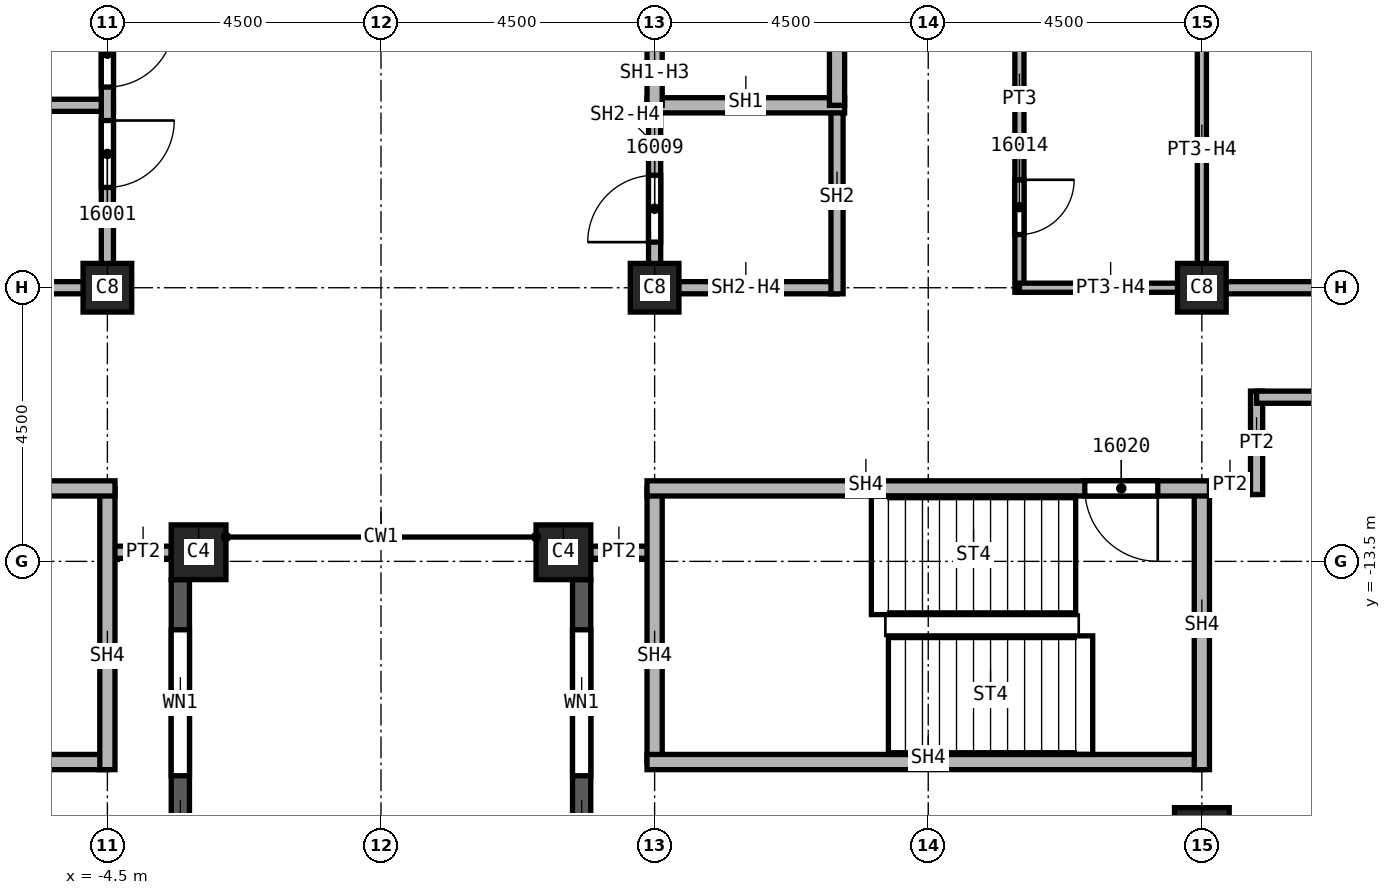
"""IFC4 building model, lengths in metres.
Left out: names, types, materials, properties, quantities, classifications, styles, units other than length and angle.
Written with IfcOpenShell. Run it as: python <this file> out.ifc"""

import sys

from ifc_helpers import new_model, si_unit, direction, frame, frame_2d, origin, origin_2d, place, context, subcontext, project, spatial, rectangle, extrude, element, fill, save


model = new_model("IFC4")
c1 = context("Model", 3, precision=1e-05, world=origin(), true_north=direction((0.0, 1.0)))
c2 = subcontext(c1, "Body", "Model", "MODEL_VIEW")
j1 = project(units=[si_unit("LENGTHUNIT", "METRE"), si_unit("PLANEANGLEUNIT", "RADIAN")], contexts=[c1])
p1 = place(None, origin())
s1 = spatial("IfcSite", under=j1, at=p1, CompositionType="ELEMENT")
p2 = place(p1, origin())
s2 = spatial("IfcBuilding", under=s1, at=p2, CompositionType="ELEMENT")
p3 = place(p2, frame((0.0, 0.0, 246.0)))
s3 = spatial("IfcBuildingStorey", under=s2, at=p3, CompositionType="ELEMENT", Elevation=246.0)
p4 = place(p3, frame((13.5, -18.0, 0.0), z_axis=(0.0, 0.0, 1.0), x_axis=(1.0, 0.0, 0.0)))
e1 = element("IfcColumn", 1, at=p4, inside=s3, PredefinedType="COLUMN", context=c2, shape_type="SweptSolid", body=[
    extrude(rectangle(XDim=0.9, YDim=0.9, at=origin_2d()), origin(), (0.0, 0.0, 1.0), 3.72),
])
for number, where, z_axis, x_axis in (
    (2, (4.5, -9.0, 0.0), (0.0, 0.0, 1.0), (1.0, 0.0, 0.0)),
    (3, (13.5, -9.0, 0.0), (0.0, 0.0, 1.0), (1.0, 0.0, 0.0)),
    (4, (-4.5, -9.0, 0.0), (0.0, 0.0, 1.0), (1.0, 0.0, 0.0)),
):
    element("IfcColumn", number, at=place(p3, frame(where, z_axis=z_axis, x_axis=x_axis)), inside=s3, PredefinedType="COLUMN", context=c2, shape_type="SweptSolid", body=[
        extrude(rectangle(XDim=0.8, YDim=0.8, at=origin_2d()), origin(), (0.0, 0.0, 1.0), 3.72),
    ])
for number, where, z_axis, x_axis in (
    (5, (3.0, -13.35, 0.0), (0.0, 0.0, 1.0), (1.0, 0.0, 0.0)),
    (6, (-3.0, -13.35, 0.0), (0.0, 0.0, 1.0), (1.0, 0.0, 0.0)),
):
    element("IfcColumn", number, at=place(p3, frame(where, z_axis=z_axis, x_axis=x_axis)), inside=s3, PredefinedType="COLUMN", context=c2, shape_type="SweptSolid", body=[
        extrude(rectangle(XDim=0.9, YDim=0.9, at=origin_2d()), origin(), (0.0, 0.0, 1.0), 3.72),
    ])
p5 = place(p3, frame((-3.3, -21.9, 0.0), z_axis=(0.0, 0.0, 1.0), x_axis=(0.0, 1.0, 0.0)))
e7 = element("IfcWall", 7, at=p5, inside=s3, PredefinedType="SOLIDWALL", context=c2, shape_type="SweptSolid", body=[
    extrude(rectangle(XDim=8.1, YDim=0.3, at=frame_2d((4.05, 0.0))), origin(), (0.0, 0.0, 1.0), 3.12),
])
p6 = place(p5, frame((0.825, 0.0, 0.8)))
e8 = element("IfcOpeningElement", 8, at=p6, cuts=e7, PredefinedType="OPENING", context=c2, shape_type="SweptSolid", body=[
    extrude(rectangle(XDim=2.4, YDim=1.95, at=frame_2d((1.2, 0.975))), frame((0.0, 0.15, 0.0), z_axis=(0.0, -1.0, 0.0), x_axis=(1.0, 0.0, 0.0)), (0.0, 0.0, 1.0), 0.3),
])
p7 = place(p5, frame((4.875, 0.0, 0.8)))
e9 = element("IfcOpeningElement", 9, at=p7, cuts=e7, PredefinedType="OPENING", context=c2, shape_type="SweptSolid", body=[
    extrude(rectangle(XDim=2.4, YDim=1.95, at=frame_2d((1.2, 0.975))), frame((0.0, 0.15, 0.0), z_axis=(0.0, -1.0, 0.0), x_axis=(1.0, 0.0, 0.0)), (0.0, 0.0, 1.0), 0.3),
])
p8 = place(p3, frame((3.3, -13.8, 0.0), z_axis=(0.0, 0.0, 1.0), x_axis=(0.0, -1.0, 0.0)))
e10 = element("IfcWall", 10, at=p8, inside=s3, PredefinedType="SOLIDWALL", context=c2, shape_type="SweptSolid", body=[
    extrude(rectangle(XDim=8.1, YDim=0.3, at=frame_2d((4.05, 0.0))), origin(), (0.0, 0.0, 1.0), 3.12),
])
p9 = place(p8, frame((0.825, 0.0, 0.8)))
e11 = element("IfcOpeningElement", 11, at=p9, cuts=e10, PredefinedType="OPENING", context=c2, shape_type="SweptSolid", body=[
    extrude(rectangle(XDim=2.4, YDim=1.95, at=frame_2d((1.2, 0.975))), frame((0.0, 0.15, 0.0), z_axis=(0.0, -1.0, 0.0), x_axis=(1.0, 0.0, 0.0)), (0.0, 0.0, 1.0), 0.3),
])
p10 = place(p8, frame((4.875, 0.0, 0.8)))
e12 = element("IfcOpeningElement", 12, at=p10, cuts=e10, PredefinedType="OPENING", context=c2, shape_type="SweptSolid", body=[
    extrude(rectangle(XDim=2.4, YDim=1.95, at=frame_2d((1.2, 0.975))), frame((0.0, 0.15, 0.0), z_axis=(0.0, -1.0, 0.0), x_axis=(1.0, 0.0, 0.0)), (0.0, 0.0, 1.0), 0.3),
])
for number, where, z_axis, x_axis in (
    (13, (-3.45, -13.35, 0.0), (0.0, 0.0, 1.0), (-1.0, 0.0, 0.0)),
    (14, (4.5, -13.35, 0.0), (0.0, 0.0, 1.0), (-1.0, 0.0, 0.0)),
):
    element("IfcWall", number, at=place(p3, frame(where, z_axis=z_axis, x_axis=x_axis)), inside=s3, PredefinedType="PARTITIONING", context=c2, shape_type="SweptSolid", body=[
        extrude(rectangle(XDim=1.05, YDim=0.2, at=frame_2d((0.525, 0.0))), origin(), (0.0, 0.0, 1.0), 3.72),
    ])
p11 = place(p3, frame((13.5, -9.0, 0.0), z_axis=(0.0, 0.0, 1.0), x_axis=(1.0, 0.0, 0.0)))
e15 = element("IfcWall", 15, at=p11, inside=s3, PredefinedType="PARTITIONING", context=c2, shape_type="SweptSolid", body=[
    extrude(rectangle(XDim=4.5, YDim=0.2, at=frame_2d((2.25, 0.0))), origin(), (0.0, 0.0, 1.0), 3.72),
])
p12 = place(p3, frame((14.4, -12.3, 0.0), z_axis=(0.0, 0.0, 1.0), x_axis=(-1.0, 0.0, 0.0)))
e16 = element("IfcWall", 16, at=p12, inside=s3, PredefinedType="PARTITIONING", context=c2, shape_type="SweptSolid", body=[
    extrude(rectangle(XDim=1.025, YDim=0.2, at=frame_2d((0.512, 0.0))), origin(), (0.0, 0.0, 1.0), 3.72),
])
p13 = place(p3, frame((14.4, -10.7, 0.0), z_axis=(0.0, 0.0, 1.0), x_axis=(0.0, -1.0, 0.0)))
e17 = element("IfcWall", 17, at=p13, inside=s3, PredefinedType="PARTITIONING", context=c2, shape_type="SweptSolid", body=[
    extrude(rectangle(XDim=1.7, YDim=0.2, at=frame_2d((0.85, 0.0))), origin(), (0.0, 0.0, 1.0), 3.72),
])
p14 = place(p3, frame((18.0, -10.8, 0.0), z_axis=(0.0, 0.0, 1.0), x_axis=(-1.0, 0.0, 0.0)))
e18 = element("IfcWall", 18, at=p14, inside=s3, PredefinedType="PARTITIONING", context=c2, shape_type="SweptSolid", body=[
    extrude(rectangle(XDim=3.6, YDim=0.2, at=frame_2d((1.8, 0.0))), origin(), (0.0, 0.0, 1.0), 3.72),
])
p15 = place(p3, frame((-7.6, -6.0, 0.0), z_axis=(0.0, 0.0, 1.0), x_axis=(1.0, 0.0, 0.0)))
e19 = element("IfcWall", 19, at=p15, inside=s3, PredefinedType="SOLIDWALL", context=c2, shape_type="SweptSolid", body=[
    extrude(rectangle(XDim=3.2, YDim=0.2, at=frame_2d((1.6, 0.0))), origin(), (0.0, 0.0, 1.0), 3.72),
])
p16 = place(p3, frame((-4.5, -9.0, 0.0), z_axis=(0.0, 0.0, 1.0), x_axis=(-1.0, 0.0, 0.0)))
e20 = element("IfcWall", 20, at=p16, inside=s3, PredefinedType="SOLIDWALL", context=c2, shape_type="SweptSolid", body=[
    extrude(rectangle(XDim=3.0, YDim=0.2, at=frame_2d((1.5, 0.0))), origin(), (0.0, 0.0, 1.0), 3.042),
])
p17 = place(p3, frame((-4.5, 0.0, 0.0), z_axis=(0.0, 0.0, 1.0), x_axis=(0.0, -1.0, 0.0)))
e21 = element("IfcWall", 21, at=p17, inside=s3, PredefinedType="SOLIDWALL", context=c2, shape_type="SweptSolid", body=[
    extrude(rectangle(XDim=9.1, YDim=0.2, at=frame_2d((4.55, 0.0))), origin(), (0.0, 0.0, 1.0), 3.042),
])
p18 = place(p17, frame((6.25, 0.0, 0.0)))
e22 = element("IfcOpeningElement", 22, at=p18, cuts=e21, PredefinedType="OPENING", context=c2, shape_type="SweptSolid", body=[
    extrude(rectangle(XDim=1.1, YDim=2.1, at=frame_2d((0.55, 1.05))), frame((0.0, 0.1, 0.0), z_axis=(0.0, -1.0, 0.0), x_axis=(1.0, 0.0, 0.0)), (0.0, 0.0, 1.0), 0.2),
])
p19 = place(p17, frame((4.6, 0.0, 0.0)))
e23 = element("IfcOpeningElement", 23, at=p19, cuts=e21, PredefinedType="OPENING", context=c2, shape_type="SweptSolid", body=[
    extrude(rectangle(XDim=1.1, YDim=2.1, at=frame_2d((0.55, 1.05))), frame((0.0, 0.1, 0.0), z_axis=(0.0, -1.0, 0.0), x_axis=(1.0, 0.0, 0.0)), (0.0, 0.0, 1.0), 0.2),
])
p20 = place(p3, frame((4.5, -9.1, 0.0), z_axis=(0.0, 0.0, 1.0), x_axis=(0.0, 1.0, 0.0)))
e24 = element("IfcWall", 24, at=p20, inside=s3, PredefinedType="SOLIDWALL", context=c2, shape_type="SweptSolid", body=[
    extrude(rectangle(XDim=3.1, YDim=0.2, at=frame_2d((1.55, 0.0))), origin(), (0.0, 0.0, 1.0), 3.042),
])
p21 = place(p20, frame((0.85, 0.0, 0.0)))
e25 = element("IfcOpeningElement", 25, at=p21, cuts=e24, PredefinedType="OPENING", context=c2, shape_type="SweptSolid", body=[
    extrude(rectangle(XDim=1.1, YDim=2.1, at=frame_2d((0.55, 1.05))), frame((0.0, 0.1, 0.0), z_axis=(0.0, -1.0, 0.0), x_axis=(1.0, 0.0, 0.0)), (0.0, 0.0, 1.0), 0.2),
])
p22 = place(p3, frame((7.5, -9.0, 0.0), z_axis=(0.0, 0.0, 1.0), x_axis=(-1.0, 0.0, 0.0)))
e26 = element("IfcWall", 26, at=p22, inside=s3, PredefinedType="SOLIDWALL", context=c2, shape_type="SweptSolid", body=[
    extrude(rectangle(XDim=3.0, YDim=0.2, at=frame_2d((1.5, 0.0))), origin(), (0.0, 0.0, 1.0), 3.042),
])
p23 = place(p3, frame((7.5, -6.0, 0.0), z_axis=(0.0, 0.0, 1.0), x_axis=(0.0, -1.0, 0.0)))
e27 = element("IfcWall", 27, at=p23, inside=s3, PredefinedType="SOLIDWALL", context=c2, shape_type="SweptSolid", body=[
    extrude(rectangle(XDim=3.1, YDim=0.2, at=frame_2d((1.55, 0.0))), origin(), (0.0, 0.0, 1.0), 3.72),
])
p24 = place(p3, frame((4.375, -6.0, 0.0), z_axis=(0.0, 0.0, 1.0), x_axis=(1.0, 0.0, 0.0)))
e28 = element("IfcWall", 28, at=p24, inside=s3, PredefinedType="SOLIDWALL", context=c2, shape_type="SweptSolid", body=[
    extrude(rectangle(XDim=3.25, YDim=0.25, at=frame_2d((1.625, 0.0))), origin(), (0.0, 0.0, 1.0), 3.72),
])
p25 = place(p3, frame((4.5, -6.0, 0.0), z_axis=(0.0, 0.0, 1.0), x_axis=(0.0, 1.0, 0.0)))
e29 = element("IfcWall", 29, at=p25, inside=s3, PredefinedType="SOLIDWALL", context=c2, shape_type="SweptSolid", body=[
    extrude(rectangle(XDim=6.0, YDim=0.25, at=frame_2d((3.0, 0.0))), origin(), (0.0, 0.0, 1.0), 3.042),
])
p26 = place(p25, frame((0.95, 0.0, 0.0)))
e30 = element("IfcOpeningElement", 30, at=p26, cuts=e29, PredefinedType="OPENING", context=c2, shape_type="SweptSolid", body=[
    extrude(rectangle(XDim=1.1, YDim=2.1, at=frame_2d((0.55, 1.05))), frame((0.0, 0.125, 0.0), z_axis=(0.0, -1.0, 0.0), x_axis=(1.0, 0.0, 0.0)), (0.0, 0.0, 1.0), 0.25),
])
p27 = place(p25, frame((3.95, 0.0, 0.0)))
e31 = element("IfcOpeningElement", 31, at=p27, cuts=e29, PredefinedType="OPENING", context=c2, shape_type="SweptSolid", body=[
    extrude(rectangle(XDim=1.1, YDim=2.1, at=frame_2d((0.55, 1.05))), frame((0.0, 0.125, 0.0), z_axis=(0.0, -1.0, 0.0), x_axis=(1.0, 0.0, 0.0)), (0.0, 0.0, 1.0), 0.25),
])
for number, where, z_axis, x_axis in (
    (32, (7.5, 3.125, 0.0), (0.0, 0.0, 1.0), (0.0, -1.0, 0.0)),
    (33, (-4.5, -16.8, 0.0), (0.0, 0.0, 1.0), (-1.0, 0.0, 0.0)),
):
    element("IfcWall", number, at=place(p3, frame(where, z_axis=z_axis, x_axis=x_axis)), inside=s3, PredefinedType="SOLIDWALL", context=c2, shape_type="SweptSolid", body=[
        extrude(rectangle(XDim=9.125, YDim=0.25, at=frame_2d((4.562, 0.0))), origin(), (0.0, 0.0, 1.0), 3.72),
    ])
p28 = place(p3, frame((-4.5, -12.3, 0.0), z_axis=(0.0, 0.0, 1.0), x_axis=(0.0, -1.0, 0.0)))
e34 = element("IfcWall", 34, at=p28, inside=s3, PredefinedType="SOLIDWALL", context=c2, shape_type="SweptSolid", body=[
    extrude(rectangle(XDim=4.625, YDim=0.25, at=frame_2d((2.312, 0.0))), origin(), (0.0, 0.0, 1.0), 3.72),
])
p29 = place(p3, frame((-4.375, -12.3, 0.0), z_axis=(0.0, 0.0, 1.0), x_axis=(-1.0, 0.0, 0.0)))
e35 = element("IfcWall", 35, at=p29, inside=s3, PredefinedType="SOLIDWALL", context=c2, shape_type="SweptSolid", body=[
    extrude(rectangle(XDim=9.25, YDim=0.25, at=frame_2d((4.625, 0.0))), origin(), (0.0, 0.0, 1.0), 3.72),
])
p30 = place(p29, frame((7.2, 0.0, 0.0)))
e36 = element("IfcOpeningElement", 36, at=p30, cuts=e35, PredefinedType="OPENING", context=c2, shape_type="SweptSolid", body=[
    extrude(rectangle(XDim=1.2, YDim=2.1, at=frame_2d((0.6, 1.05))), frame((0.0, 0.125, 0.0), z_axis=(0.0, -1.0, 0.0), x_axis=(1.0, 0.0, 0.0)), (0.0, 0.0, 1.0), 0.25),
])
p31 = place(p3, frame((4.5, -16.8, 0.0), z_axis=(0.0, 0.0, 1.0), x_axis=(0.0, 1.0, 0.0)))
e37 = element("IfcWall", 37, at=p31, inside=s3, PredefinedType="SOLIDWALL", context=c2, shape_type="SweptSolid", body=[
    extrude(rectangle(XDim=4.5, YDim=0.25, at=frame_2d((2.25, 0.0))), origin(), (0.0, 0.0, 1.0), 3.72),
])
p32 = place(p3, frame((13.5, -16.8, 0.0), z_axis=(0.0, 0.0, 1.0), x_axis=(-1.0, 0.0, 0.0)))
e38 = element("IfcWall", 38, at=p32, inside=s3, PredefinedType="SOLIDWALL", context=c2, shape_type="SweptSolid", body=[
    extrude(rectangle(XDim=9.125, YDim=0.25, at=frame_2d((4.562, 0.0))), origin(), (0.0, 0.0, 1.0), 3.72),
])
p33 = place(p3, frame((13.5, -12.3, 0.0), z_axis=(0.0, 0.0, 1.0), x_axis=(0.0, -1.0, 0.0)))
e39 = element("IfcWall", 39, at=p33, inside=s3, PredefinedType="SOLIDWALL", context=c2, shape_type="SweptSolid", body=[
    extrude(rectangle(XDim=4.625, YDim=0.25, at=frame_2d((2.312, 0.0))), origin(), (0.0, 0.0, 1.0), 3.72),
])
p34 = place(p3, frame((13.625, -12.3, 0.0), z_axis=(0.0, 0.0, 1.0), x_axis=(-1.0, 0.0, 0.0)))
e40 = element("IfcWall", 40, at=p34, inside=s3, PredefinedType="SOLIDWALL", context=c2, shape_type="SweptSolid", body=[
    extrude(rectangle(XDim=9.25, YDim=0.25, at=frame_2d((4.625, 0.0))), origin(), (0.0, 0.0, 1.0), 3.72),
])
p35 = place(p34, frame((0.85, 0.0, 0.0)))
e41 = element("IfcOpeningElement", 41, at=p35, cuts=e40, PredefinedType="OPENING", context=c2, shape_type="SweptSolid", body=[
    extrude(rectangle(XDim=1.2, YDim=2.1, at=frame_2d((0.6, 1.05))), frame((0.0, 0.125, 0.0), z_axis=(0.0, -1.0, 0.0), x_axis=(1.0, 0.0, 0.0)), (0.0, 0.0, 1.0), 0.25),
])
p36 = place(p3, frame((10.5, -4.425, 0.0), z_axis=(0.0, 0.0, 1.0), x_axis=(0.0, -1.0, 0.0)))
e42 = element("IfcWall", 42, at=p36, inside=s3, PredefinedType="PARTITIONING", context=c2, shape_type="SweptSolid", body=[
    extrude(rectangle(XDim=4.65, YDim=0.15, at=frame_2d((2.325, 0.0))), origin(), (0.0, 0.0, 1.0), 3.72),
])
p37 = place(p36, frame((2.8, 0.0, 0.0)))
e43 = element("IfcOpeningElement", 43, at=p37, cuts=e42, PredefinedType="OPENING", context=c2, shape_type="SweptSolid", body=[
    extrude(rectangle(XDim=0.9, YDim=2.1, at=frame_2d((0.45, 1.05))), frame((0.0, 0.075, 0.0), z_axis=(0.0, -1.0, 0.0), x_axis=(1.0, 0.0, 0.0)), (0.0, 0.0, 1.0), 0.15),
])
p38 = place(p3, frame((13.5, -4.5, 0.0), z_axis=(0.0, 0.0, 1.0), x_axis=(0.0, -1.0, 0.0)))
e44 = element("IfcWall", 44, at=p38, inside=s3, PredefinedType="PARTITIONING", context=c2, shape_type="SweptSolid", body=[
    extrude(rectangle(XDim=4.6, YDim=0.15, at=frame_2d((2.3, 0.0))), origin(), (0.0, 0.0, 1.0), 3.042),
])
p39 = place(p3, frame((13.575, -9.0, 0.0), z_axis=(0.0, 0.0, 1.0), x_axis=(-1.0, 0.0, 0.0)))
e45 = element("IfcWall", 45, at=p39, inside=s3, PredefinedType="PARTITIONING", context=c2, shape_type="SweptSolid", body=[
    extrude(rectangle(XDim=3.075, YDim=0.15, at=frame_2d((1.538, 0.0))), origin(), (0.0, 0.0, 1.0), 3.042),
])
p40 = place(p7, origin())
e46 = element("IfcWindow", 46, at=p40, inside=s3, PartitioningType="SINGLE_PANEL", PredefinedType="WINDOW", context=c2, shape_type="SweptSolid", body=[
    extrude(rectangle(XDim=2.4, YDim=1.95, at=frame_2d((1.2, 0.975))), frame((0.0, 0.03, 0.0), z_axis=(0.0, -1.0, 0.0), x_axis=(1.0, 0.0, 0.0)), (0.0, 0.0, 1.0), 0.06),
])
fill(e9, e46)
p41 = place(p9, origin())
e47 = element("IfcWindow", 47, at=p41, inside=s3, PartitioningType="SINGLE_PANEL", PredefinedType="WINDOW", context=c2, shape_type="SweptSolid", body=[
    extrude(rectangle(XDim=2.4, YDim=1.95, at=frame_2d((1.2, 0.975))), frame((0.0, 0.03, 0.0), z_axis=(0.0, -1.0, 0.0), x_axis=(1.0, 0.0, 0.0)), (0.0, 0.0, 1.0), 0.06),
])
fill(e11, e47)
p42 = place(p18, origin())
e48 = element("IfcDoor", 48, at=p42, inside=s3, OperationType="SINGLE_SWING_RIGHT", PredefinedType="DOOR", context=c2, shape_type="SweptSolid", body=[
    extrude(rectangle(XDim=1.1, YDim=2.1, at=frame_2d((0.55, 1.05))), frame((0.0, 0.025, 0.0), z_axis=(0.0, -1.0, 0.0), x_axis=(1.0, 0.0, 0.0)), (0.0, 0.0, 1.0), 0.05),
])
fill(e22, e48)
p43 = place(p19, origin())
e49 = element("IfcDoor", 49, at=p43, inside=s3, OperationType="SINGLE_SWING_LEFT", PredefinedType="DOOR", context=c2, shape_type="SweptSolid", body=[
    extrude(rectangle(XDim=1.1, YDim=2.1, at=frame_2d((0.55, 1.05))), frame((0.0, 0.025, 0.0), z_axis=(0.0, -1.0, 0.0), x_axis=(1.0, 0.0, 0.0)), (0.0, 0.0, 1.0), 0.05),
])
fill(e23, e49)
p44 = place(p21, origin())
e50 = element("IfcDoor", 50, at=p44, inside=s3, OperationType="SINGLE_SWING_RIGHT", PredefinedType="DOOR", context=c2, shape_type="SweptSolid", body=[
    extrude(rectangle(XDim=1.1, YDim=2.1, at=frame_2d((0.55, 1.05))), frame((0.0, 0.025, 0.0), z_axis=(0.0, -1.0, 0.0), x_axis=(1.0, 0.0, 0.0)), (0.0, 0.0, 1.0), 0.05),
])
fill(e25, e50)
p45 = place(p37, origin())
e51 = element("IfcDoor", 51, at=p45, inside=s3, OperationType="SINGLE_SWING_LEFT", PredefinedType="DOOR", context=c2, shape_type="SweptSolid", body=[
    extrude(rectangle(XDim=0.9, YDim=2.1, at=frame_2d((0.45, 1.05))), frame((0.0, 0.025, 0.0), z_axis=(0.0, -1.0, 0.0), x_axis=(1.0, 0.0, 0.0)), (0.0, 0.0, 1.0), 0.05),
])
fill(e43, e51)
p46 = place(p35, origin())
e52 = element("IfcDoor", 52, at=p46, inside=s3, OperationType="SINGLE_SWING_LEFT", PredefinedType="DOOR", context=c2, shape_type="SweptSolid", body=[
    extrude(rectangle(XDim=1.2, YDim=2.1, at=frame_2d((0.6, 1.05))), frame((0.0, 0.025, 0.0), z_axis=(0.0, -1.0, 0.0), x_axis=(1.0, 0.0, 0.0)), (0.0, 0.0, 1.0), 0.05),
])
fill(e41, e52)
save(model, sys.argv[1])
